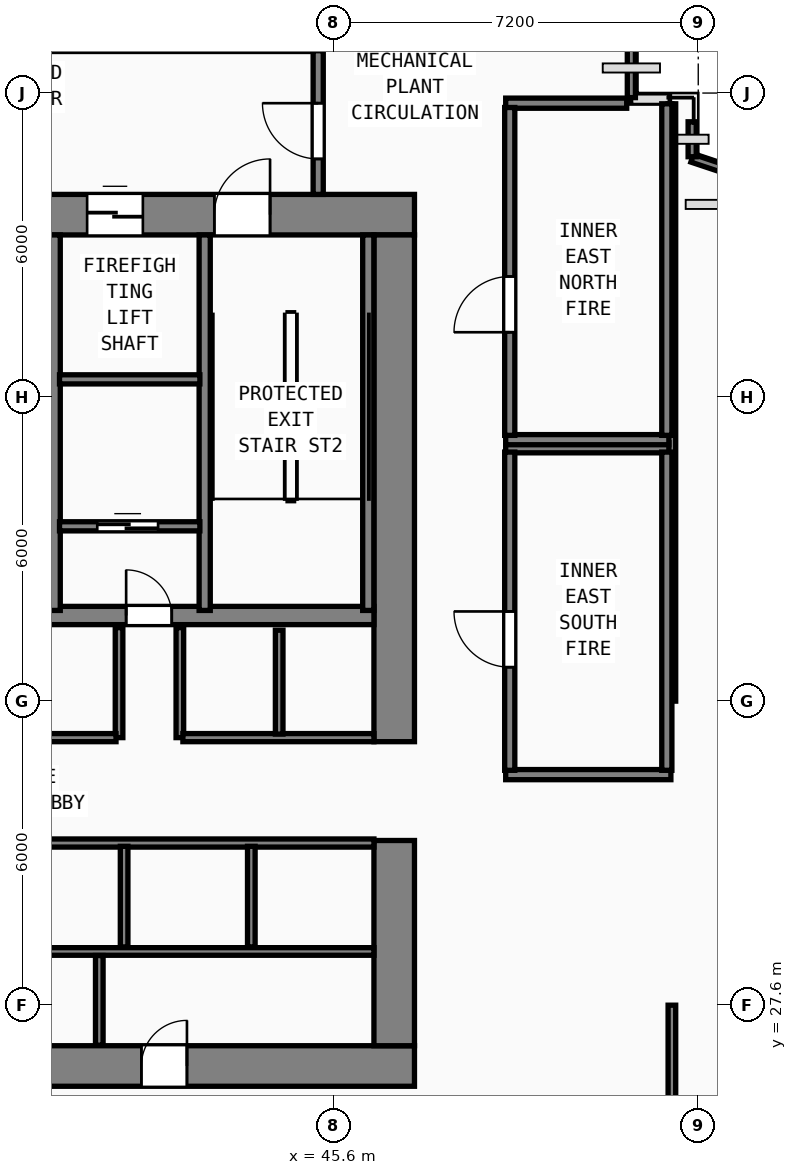
"""IFC4 building model, lengths in metres.
Left out: names, types, materials, properties, quantities, classifications, styles, units other than length and angle.
Written with IfcOpenShell. Run it as: python <this file> out.ifc"""

import sys

from ifc_helpers import new_model, si_unit, direction, frame, frame_2d, origin, origin_2d, place, context, subcontext, project, spatial, rectangle, hollow_rectangle, extrude, element, fill, save


model = new_model("IFC4")
c1 = context("Model", 3, precision=1e-05, world=origin(), true_north=direction((0.0, 1.0)))
c2 = subcontext(c1, "Body", "Model", "MODEL_VIEW")
j1 = project(units=[si_unit("LENGTHUNIT", "METRE"), si_unit("PLANEANGLEUNIT", "RADIAN")], contexts=[c1])
p1 = place(None, origin())
s1 = spatial("IfcSite", under=j1, at=p1, CompositionType="ELEMENT")
p2 = place(p1, origin())
s2 = spatial("IfcBuilding", under=s1, at=p2, CompositionType="ELEMENT")
p3 = place(p2, frame((0.0, 0.0, 89.4)))
s3 = spatial("IfcBuildingStorey", under=s2, at=p3, CompositionType="ELEMENT", Elevation=89.4)
p4 = place(p3, frame((29.6, 26.4, 0.0), z_axis=(0.0, 0.0, 1.0), x_axis=(1.0, 0.0, 0.0)))
e1 = element("IfcWall", 1, at=p4, inside=s3, PredefinedType="SHEAR", context=c2, shape_type="SweptSolid", body=[
    extrude(rectangle(XDim=17.6, YDim=0.8, at=frame_2d((8.8, 0.0))), origin(), (0.0, 0.0, 1.0), 4.35),
])
p5 = place(p4, frame((4.5, 0.0, 0.0), z_axis=(0.0, 0.0, 1.0), x_axis=(-1.0, 0.0, 0.0)))
e2 = element("IfcOpeningElement", 2, at=p5, cuts=e1, PredefinedType="OPENING", context=c2, shape_type="SweptSolid", body=[
    extrude(rectangle(XDim=0.9, YDim=2.1, at=frame_2d((0.45, 1.05))), frame((0.0, 0.41, 0.0), z_axis=(0.0, -1.0, 0.0), x_axis=(1.0, 0.0, 0.0)), (0.0, 0.0, 1.0), 0.82),
])
p6 = place(p4, frame((7.31, 0.0, 0.0), z_axis=(0.0, 0.0, 1.0), x_axis=(-1.0, 0.0, 0.0)))
e3 = element("IfcOpeningElement", 3, at=p6, cuts=e1, PredefinedType="OPENING", context=c2, shape_type="SweptSolid", body=[
    extrude(rectangle(XDim=0.9, YDim=2.1, at=frame_2d((0.45, 1.05))), frame((0.0, 0.41, 0.0), z_axis=(0.0, -1.0, 0.0), x_axis=(1.0, 0.0, 0.0)), (0.0, 0.0, 1.0), 0.82),
])
p7 = place(p4, frame((13.11, 0.0, 0.0), z_axis=(0.0, 0.0, 1.0), x_axis=(-1.0, 0.0, 0.0)))
e4 = element("IfcOpeningElement", 4, at=p7, cuts=e1, PredefinedType="OPENING", context=c2, shape_type="SweptSolid", body=[
    extrude(rectangle(XDim=0.9, YDim=2.1, at=frame_2d((0.45, 1.05))), frame((0.0, 0.41, 0.0), z_axis=(0.0, -1.0, 0.0), x_axis=(1.0, 0.0, 0.0)), (0.0, 0.0, 1.0), 0.82),
])
p8 = place(p3, frame((29.6, 43.2, 0.0), z_axis=(0.0, 0.0, 1.0), x_axis=(1.0, 0.0, 0.0)))
e5 = element("IfcWall", 5, at=p8, inside=s3, PredefinedType="SHEAR", context=c2, shape_type="SweptSolid", body=[
    extrude(rectangle(XDim=17.6, YDim=0.8, at=frame_2d((8.8, 0.0))), origin(), (0.0, 0.0, 1.0), 4.35),
])
p9 = place(p8, frame((2.45, 0.0, 0.0)))
e6 = element("IfcOpeningElement", 6, at=p9, cuts=e5, PredefinedType="OPENING", context=c2, shape_type="SweptSolid", body=[
    extrude(rectangle(XDim=1.1, YDim=2.15, at=frame_2d((0.55, 1.075))), frame((0.0, 0.41, 0.0), z_axis=(0.0, -1.0, 0.0), x_axis=(1.0, 0.0, 0.0)), (0.0, 0.0, 1.0), 0.82),
])
p10 = place(p8, frame((7.56, 0.0, 0.0)))
e7 = element("IfcOpeningElement", 7, at=p10, cuts=e5, PredefinedType="OPENING", context=c2, shape_type="SweptSolid", body=[
    extrude(rectangle(XDim=1.1, YDim=2.15, at=frame_2d((0.55, 1.075))), frame((0.0, 0.41, 0.0), z_axis=(0.0, -1.0, 0.0), x_axis=(1.0, 0.0, 0.0)), (0.0, 0.0, 1.0), 0.82),
])
p11 = place(p8, frame((13.65, 0.0, 0.0)))
e8 = element("IfcOpeningElement", 8, at=p11, cuts=e5, PredefinedType="OPENING", context=c2, shape_type="SweptSolid", body=[
    extrude(rectangle(XDim=1.1, YDim=2.15, at=frame_2d((0.55, 1.075))), frame((0.0, 0.41, 0.0), z_axis=(0.0, -1.0, 0.0), x_axis=(1.0, 0.0, 0.0)), (0.0, 0.0, 1.0), 0.82),
])
p12 = place(p8, frame((4.78, 0.0, 0.0)))
e9 = element("IfcOpeningElement", 9, at=p12, cuts=e5, PredefinedType="OPENING", context=c2, shape_type="SweptSolid", body=[
    extrude(rectangle(XDim=1.1, YDim=2.2, at=frame_2d((0.55, 1.1))), frame((0.0, 0.41, 0.0), z_axis=(0.0, -1.0, 0.0), x_axis=(1.0, 0.0, 0.0)), (0.0, 0.0, 1.0), 0.82),
])
p13 = place(p8, frame((11.14, 0.0, 0.0)))
e10 = element("IfcOpeningElement", 10, at=p13, cuts=e5, PredefinedType="OPENING", context=c2, shape_type="SweptSolid", body=[
    extrude(rectangle(XDim=1.1, YDim=2.2, at=frame_2d((0.55, 1.1))), frame((0.0, 0.41, 0.0), z_axis=(0.0, -1.0, 0.0), x_axis=(1.0, 0.0, 0.0)), (0.0, 0.0, 1.0), 0.82),
])
p14 = place(p3, frame((46.8, 26.8, 0.0), z_axis=(0.0, 0.0, 1.0), x_axis=(0.0, 1.0, 0.0)))
e11 = element("IfcWall", 11, at=p14, inside=s3, PredefinedType="SHEAR", context=c2, shape_type="SweptSolid", body=[
    extrude(rectangle(XDim=4.05, YDim=0.8, at=frame_2d((2.025, 0.0))), origin(), (0.0, 0.0, 1.0), 4.35),
])
p15 = place(p3, frame((46.8, 32.8, 0.0), z_axis=(0.0, 0.0, 1.0), x_axis=(0.0, 1.0, 0.0)))
e12 = element("IfcWall", 12, at=p15, inside=s3, PredefinedType="SHEAR", context=c2, shape_type="SweptSolid", body=[
    extrude(rectangle(XDim=10.0, YDim=0.8, at=frame_2d((5.0, 0.0))), origin(), (0.0, 0.0, 1.0), 4.35),
])
p16 = place(p3, frame((30.4, 35.29, 0.0), z_axis=(0.0, 0.0, 1.0), x_axis=(1.0, 0.0, 0.0)))
e13 = element("IfcWall", 13, at=p16, inside=s3, PredefinedType="SHEAR", context=c2, shape_type="SweptSolid", body=[
    extrude(rectangle(XDim=16.0, YDim=0.36, at=frame_2d((8.0, 0.0))), origin(), (0.0, 0.0, 1.0), 4.35),
])
p17 = place(p16, frame((4.95, 0.0, 0.0), z_axis=(0.0, 0.0, 1.0), x_axis=(-1.0, 0.0, 0.0)))
e14 = element("IfcOpeningElement", 14, at=p17, cuts=e13, PredefinedType="OPENING", context=c2, shape_type="SweptSolid", body=[
    extrude(rectangle(XDim=0.9, YDim=2.1, at=frame_2d((0.45, 1.05))), frame((0.0, 0.19, 0.0), z_axis=(0.0, -1.0, 0.0), x_axis=(1.0, 0.0, 0.0)), (0.0, 0.0, 1.0), 0.38),
])
p18 = place(p16, frame((12.01, 0.0, 0.0), z_axis=(0.0, 0.0, 1.0), x_axis=(-1.0, 0.0, 0.0)))
e15 = element("IfcOpeningElement", 15, at=p18, cuts=e13, PredefinedType="OPENING", context=c2, shape_type="SweptSolid", body=[
    extrude(rectangle(XDim=0.9, YDim=2.1, at=frame_2d((0.45, 1.05))), frame((0.0, 0.19, 0.0), z_axis=(0.0, -1.0, 0.0), x_axis=(1.0, 0.0, 0.0)), (0.0, 0.0, 1.0), 0.38),
])
for number, where, z_axis, x_axis in (
    (16, (40.1, 35.39, 0.0), (0.0, 0.0, 1.0), (0.0, 1.0, 0.0)),
    (17, (43.06, 35.39, 0.0), (0.0, 0.0, 1.0), (0.0, 1.0, 0.0)),
    (18, (46.288, 35.39, 0.0), (0.0, 0.0, 1.0), (0.0, 1.0, 0.0)),
):
    element("IfcWall", number, at=place(p3, frame(where, z_axis=z_axis, x_axis=x_axis)), inside=s3, PredefinedType="SHEAR", context=c2, shape_type="SweptSolid", body=[
        extrude(rectangle(XDim=7.41, YDim=0.22, at=frame_2d((3.705, 0.0))), origin(), (0.0, 0.0, 1.0), 4.35),
    ])
for number, where, z_axis, x_axis in (
    (19, (52.8, 33.6, 0.0), (0.0, 0.0, 1.0), (1.0, 0.0, 0.0)),
    (20, (52.8, 45.6, 0.0), (0.0, 0.0, 1.0), (1.0, 0.0, 0.0)),
):
    element("IfcColumn", number, at=place(p3, frame(where, z_axis=z_axis, x_axis=x_axis)), inside=s3, PredefinedType="COLUMN", context=c2, shape_type="SweptSolid", body=[
        extrude(hollow_rectangle(XDim=1.15, YDim=1.15, WallThickness=0.042, at=origin_2d()), origin(), (0.0, 0.0, 1.0), 4.6),
    ])
for number, where, z_axis, x_axis in (
    (21, (52.8, 27.6, 0.0), (0.0, 0.0, 1.0), (1.0, 0.0, 0.0)),
    (22, (52.8, 39.6, 0.0), (0.0, 0.0, 1.0), (1.0, 0.0, 0.0)),
):
    element("IfcColumn", number, at=place(p3, frame(where, z_axis=z_axis, x_axis=x_axis)), inside=s3, PredefinedType="COLUMN", context=c2, shape_type="SweptSolid", body=[
        extrude(hollow_rectangle(XDim=1.0, YDim=1.0, WallThickness=0.038, at=origin_2d()), origin(), (0.0, 0.0, 1.0), 4.6),
    ])
p19 = place(p3, frame((58.145, 42.492, 0.0), z_axis=(0.0, 0.0, 1.0), x_axis=(-0.948683298051, 0.316227766017, 0.0)))
e23 = element("IfcWall", 23, at=p19, inside=s3, PredefinedType="PARAPET", context=c2, shape_type="SweptSolid", body=[
    extrude(rectangle(XDim=5.76, YDim=0.16, at=frame_2d((2.88, 0.0))), origin(), (0.0, 0.0, 1.0), 1.15),
])
p20 = place(p3, frame((52.68, 44.344, 0.0), z_axis=(0.0, 0.0, 1.0), x_axis=(0.0, 1.0, 0.0)))
e24 = element("IfcWall", 24, at=p20, inside=s3, PredefinedType="PARAPET", context=c2, shape_type="SweptSolid", body=[
    extrude(rectangle(XDim=0.689, YDim=0.16, at=frame_2d((0.345, 0.0))), origin(), (0.0, 0.0, 1.0), 1.15),
])
p21 = place(p3, frame((52.233, 45.48, 0.0), z_axis=(0.0, 0.0, 1.0), x_axis=(-1.0, 0.0, 0.0)))
e25 = element("IfcWall", 25, at=p21, inside=s3, PredefinedType="PARAPET", context=c2, shape_type="SweptSolid", body=[
    extrude(rectangle(XDim=0.753, YDim=0.16, at=frame_2d((0.376, 0.0))), origin(), (0.0, 0.0, 1.0), 1.15),
])
p22 = place(p3, frame((51.48, 45.51, 0.0), z_axis=(0.0, 0.0, 1.0), x_axis=(0.0, 1.0, 0.0)))
e26 = element("IfcWall", 26, at=p22, inside=s3, PredefinedType="PARAPET", context=c2, shape_type="SweptSolid", body=[
    extrude(rectangle(XDim=1.17, YDim=0.16, at=frame_2d((0.585, 0.0))), origin(), (0.0, 0.0, 1.0), 1.15),
])
p23 = place(p3, frame((45.3, 43.6, 0.0), z_axis=(0.0, 0.0, 1.0), x_axis=(0.0, 1.0, 0.0)))
e27 = element("IfcWall", 27, at=p23, inside=s3, PredefinedType="SOLIDWALL", context=c2, shape_type="SweptSolid", body=[
    extrude(rectangle(XDim=2.835, YDim=0.2, at=frame_2d((1.417, 0.0))), origin(), (0.0, 0.0, 1.0), 4.35),
])
p24 = place(p23, frame((0.7, 0.0, 0.0)))
e28 = element("IfcOpeningElement", 28, at=p24, cuts=e27, PredefinedType="OPENING", context=c2, shape_type="SweptSolid", body=[
    extrude(rectangle(XDim=1.1, YDim=2.15, at=frame_2d((0.55, 1.075))), frame((0.0, 0.11, 0.0), z_axis=(0.0, -1.0, 0.0), x_axis=(1.0, 0.0, 0.0)), (0.0, 0.0, 1.0), 0.22),
])
p25 = place(p3, frame((40.195, 39.95, 0.0), z_axis=(0.0, 0.0, 1.0), x_axis=(1.0, 0.0, 0.0)))
e29 = element("IfcWall", 29, at=p25, inside=s3, PredefinedType="SOLIDWALL", context=c2, shape_type="SweptSolid", body=[
    extrude(rectangle(XDim=2.77, YDim=0.18, at=frame_2d((1.385, 0.0))), origin(), (0.0, 0.0, 1.0), 4.35),
])
p26 = place(p3, frame((40.195, 37.05, 0.0), z_axis=(0.0, 0.0, 1.0), x_axis=(1.0, 0.0, 0.0)))
e30 = element("IfcWall", 30, at=p26, inside=s3, PredefinedType="SOLIDWALL", context=c2, shape_type="SweptSolid", body=[
    extrude(rectangle(XDim=2.77, YDim=0.18, at=frame_2d((1.385, 0.0))), origin(), (0.0, 0.0, 1.0), 4.35),
])
p27 = place(p26, frame((1.945, 0.0, 0.0), z_axis=(0.0, 0.0, 1.0), x_axis=(-1.0, 0.0, 0.0)))
e31 = element("IfcOpeningElement", 31, at=p27, cuts=e30, PredefinedType="OPENING", context=c2, shape_type="SweptSolid", body=[
    extrude(rectangle(XDim=1.2, YDim=2.2, at=frame_2d((0.6, 1.1))), frame((0.0, 0.1, 0.0), z_axis=(0.0, -1.0, 0.0), x_axis=(1.0, 0.0, 0.0)), (0.0, 0.0, 1.0), 0.2),
])
for number, where, z_axis, x_axis in (
    (32, (41.37, 32.88, 0.0), (0.0, 0.0, 1.0), (0.0, 1.0, 0.0)),
    (33, (42.57, 32.88, 0.0), (0.0, 0.0, 1.0), (0.0, 1.0, 0.0)),
):
    element("IfcWall", number, at=place(p3, frame(where, z_axis=z_axis, x_axis=x_axis)), inside=s3, PredefinedType="SOLIDWALL", context=c2, shape_type="SweptSolid", body=[
        extrude(rectangle(XDim=2.17, YDim=0.15, at=frame_2d((1.085, 0.0))), origin(), (0.0, 0.0, 1.0), 4.35),
    ])
p28 = place(p3, frame((35.57, 32.88, 0.0), z_axis=(0.0, 0.0, 1.0), x_axis=(1.0, 0.0, 0.0)))
e34 = element("IfcWall", 34, at=p28, inside=s3, PredefinedType="SOLIDWALL", context=c2, shape_type="SweptSolid", body=[
    extrude(rectangle(XDim=5.74, YDim=0.16, at=frame_2d((2.87, 0.0))), origin(), (0.0, 0.0, 1.0), 4.35),
])
p29 = place(p28, frame((1.47, 0.0, 0.0), z_axis=(0.0, 0.0, 1.0), x_axis=(-1.0, 0.0, 0.0)))
e35 = element("IfcOpeningElement", 35, at=p29, cuts=e34, PredefinedType="OPENING", context=c2, shape_type="SweptSolid", body=[
    extrude(rectangle(XDim=1.1, YDim=2.2, at=frame_2d((0.55, 1.1))), frame((0.0, 0.09, 0.0), z_axis=(0.0, -1.0, 0.0), x_axis=(1.0, 0.0, 0.0)), (0.0, 0.0, 1.0), 0.18),
])
p30 = place(p28, frame((3.46, 0.0, 0.0), z_axis=(0.0, 0.0, 1.0), x_axis=(-1.0, 0.0, 0.0)))
e36 = element("IfcOpeningElement", 36, at=p30, cuts=e34, PredefinedType="OPENING", context=c2, shape_type="SweptSolid", body=[
    extrude(rectangle(XDim=1.1, YDim=2.2, at=frame_2d((0.55, 1.1))), frame((0.0, 0.09, 0.0), z_axis=(0.0, -1.0, 0.0), x_axis=(1.0, 0.0, 0.0)), (0.0, 0.0, 1.0), 0.18),
])
p31 = place(p3, frame((42.63, 32.88, 0.0), z_axis=(0.0, 0.0, 1.0), x_axis=(1.0, 0.0, 0.0)))
e37 = element("IfcWall", 37, at=p31, inside=s3, PredefinedType="SOLIDWALL", context=c2, shape_type="SweptSolid", body=[
    extrude(rectangle(XDim=3.77, YDim=0.16, at=frame_2d((1.885, 0.0))), origin(), (0.0, 0.0, 1.0), 4.35),
])
p32 = place(p3, frame((44.53, 32.95, 0.0), z_axis=(0.0, 0.0, 1.0), x_axis=(0.0, 1.0, 0.0)))
e38 = element("IfcWall", 38, at=p32, inside=s3, PredefinedType="SOLIDWALL", context=c2, shape_type="SweptSolid", body=[
    extrude(rectangle(XDim=2.05, YDim=0.15, at=frame_2d((1.025, 0.0))), origin(), (0.0, 0.0, 1.0), 4.35),
])
p33 = place(p3, frame((30.4, 30.8, 0.0), z_axis=(0.0, 0.0, 1.0), x_axis=(1.0, 0.0, 0.0)))
e39 = element("IfcWall", 39, at=p33, inside=s3, PredefinedType="SOLIDWALL", context=c2, shape_type="SweptSolid", body=[
    extrude(rectangle(XDim=16.0, YDim=0.16, at=frame_2d((8.0, 0.0))), origin(), (0.0, 0.0, 1.0), 4.35),
])
p34 = place(p3, frame((30.4, 28.66, 0.0), z_axis=(0.0, 0.0, 1.0), x_axis=(1.0, 0.0, 0.0)))
e40 = element("IfcWall", 40, at=p34, inside=s3, PredefinedType="PARTITIONING", context=c2, shape_type="SweptSolid", body=[
    extrude(rectangle(XDim=16.0, YDim=0.15, at=frame_2d((8.0, 0.0))), origin(), (0.0, 0.0, 1.0), 4.35),
])
p35 = place(p3, frame((40.98, 26.81, 0.0), z_axis=(0.0, 0.0, 1.0), x_axis=(0.0, 1.0, 0.0)))
e41 = element("IfcWall", 41, at=p35, inside=s3, PredefinedType="PARTITIONING", context=c2, shape_type="SweptSolid", body=[
    extrude(rectangle(XDim=1.77, YDim=0.15, at=frame_2d((0.885, 0.0))), origin(), (0.0, 0.0, 1.0), 4.35),
])
for number, where, z_axis, x_axis in (
    (42, (41.47, 28.75, 0.0), (0.0, 0.0, 1.0), (0.0, 1.0, 0.0)),
    (43, (43.98, 28.75, 0.0), (0.0, 0.0, 1.0), (0.0, 1.0, 0.0)),
):
    element("IfcWall", number, at=place(p3, frame(where, z_axis=z_axis, x_axis=x_axis)), inside=s3, PredefinedType="SOLIDWALL", context=c2, shape_type="SweptSolid", body=[
        extrude(rectangle(XDim=1.985, YDim=0.15, at=frame_2d((0.993, 0.0))), origin(), (0.0, 0.0, 1.0), 4.35),
    ])
p36 = place(p3, frame((52.28, 21.688, 0.0), z_axis=(0.0, 0.0, 1.0), x_axis=(0.0, 1.0, 0.0)))
e44 = element("IfcWall", 44, at=p36, inside=s3, PredefinedType="PARTITIONING", context=c2, shape_type="SweptSolid", body=[
    extrude(rectangle(XDim=5.912, YDim=0.15, at=frame_2d((2.956, 0.0))), origin(), (0.0, 0.0, 1.0), 4.35),
])
p37 = place(p3, frame((52.28, 33.6, 0.0), z_axis=(0.0, 0.0, 1.0), x_axis=(0.0, 1.0, 0.0)))
e45 = element("IfcWall", 45, at=p37, inside=s3, PredefinedType="PARTITIONING", context=c2, shape_type="SweptSolid", body=[
    extrude(rectangle(XDim=11.788, YDim=0.15, at=frame_2d((5.894, 0.0))), origin(), (0.0, 0.0, 1.0), 4.35),
])
p38 = place(p3, frame((49.0, 38.6, 0.0), z_axis=(0.0, 0.0, 1.0), x_axis=(1.0, 0.0, 0.0)))
e46 = element("IfcWall", 46, at=p38, inside=s3, PredefinedType="SOLIDWALL", context=c2, shape_type="SweptSolid", body=[
    extrude(rectangle(XDim=3.22, YDim=0.2, at=frame_2d((1.61, 0.0))), origin(), (0.0, 0.0, 1.0), 4.35),
])
p39 = place(p3, frame((49.0, 32.15, 0.0), z_axis=(0.0, 0.0, 1.0), x_axis=(1.0, 0.0, 0.0)))
e47 = element("IfcWall", 47, at=p39, inside=s3, PredefinedType="SOLIDWALL", context=c2, shape_type="SweptSolid", body=[
    extrude(rectangle(XDim=3.26, YDim=0.2, at=frame_2d((1.63, 0.0))), origin(), (0.0, 0.0, 1.0), 4.35),
])
p40 = place(p3, frame((49.08, 32.235, 0.0), z_axis=(0.0, 0.0, 1.0), x_axis=(0.0, 1.0, 0.0)))
e48 = element("IfcWall", 48, at=p40, inside=s3, PredefinedType="SOLIDWALL", context=c2, shape_type="SweptSolid", body=[
    extrude(rectangle(XDim=6.28, YDim=0.2, at=frame_2d((3.14, 0.0))), origin(), (0.0, 0.0, 1.0), 4.35),
])
p41 = place(p40, frame((2.035, 0.0, 0.0)))
e49 = element("IfcOpeningElement", 49, at=p41, cuts=e48, PredefinedType="OPENING", context=c2, shape_type="SweptSolid", body=[
    extrude(rectangle(XDim=1.1, YDim=2.15, at=frame_2d((0.55, 1.075))), frame((0.0, 0.11, 0.0), z_axis=(0.0, -1.0, 0.0), x_axis=(1.0, 0.0, 0.0)), (0.0, 0.0, 1.0), 0.22),
])
p42 = place(p3, frame((52.18, 32.235, 0.0), z_axis=(0.0, 0.0, 1.0), x_axis=(0.0, 1.0, 0.0)))
e50 = element("IfcWall", 50, at=p42, inside=s3, PredefinedType="SOLIDWALL", context=c2, shape_type="SweptSolid", body=[
    extrude(rectangle(XDim=6.28, YDim=0.2, at=frame_2d((3.14, 0.0))), origin(), (0.0, 0.0, 1.0), 4.35),
])
p43 = place(p3, frame((49.0, 45.4, 0.0), z_axis=(0.0, 0.0, 1.0), x_axis=(1.0, 0.0, 0.0)))
e51 = element("IfcWall", 51, at=p43, inside=s3, PredefinedType="SOLIDWALL", context=c2, shape_type="SweptSolid", body=[
    extrude(rectangle(XDim=2.388, YDim=0.2, at=frame_2d((1.194, 0.0))), origin(), (0.0, 0.0, 1.0), 4.35),
])
p44 = place(p3, frame((49.0, 38.76, 0.0), z_axis=(0.0, 0.0, 1.0), x_axis=(1.0, 0.0, 0.0)))
e52 = element("IfcWall", 52, at=p44, inside=s3, PredefinedType="SOLIDWALL", context=c2, shape_type="SweptSolid", body=[
    extrude(rectangle(XDim=3.22, YDim=0.2, at=frame_2d((1.61, 0.0))), origin(), (0.0, 0.0, 1.0), 4.35),
])
p45 = place(p3, frame((49.08, 38.845, 0.0), z_axis=(0.0, 0.0, 1.0), x_axis=(0.0, 1.0, 0.0)))
e53 = element("IfcWall", 53, at=p45, inside=s3, PredefinedType="SOLIDWALL", context=c2, shape_type="SweptSolid", body=[
    extrude(rectangle(XDim=6.47, YDim=0.2, at=frame_2d((3.235, 0.0))), origin(), (0.0, 0.0, 1.0), 4.35),
])
p46 = place(p45, frame((2.035, 0.0, 0.0)))
e54 = element("IfcOpeningElement", 54, at=p46, cuts=e53, PredefinedType="OPENING", context=c2, shape_type="SweptSolid", body=[
    extrude(rectangle(XDim=1.1, YDim=2.15, at=frame_2d((0.55, 1.075))), frame((0.0, 0.11, 0.0), z_axis=(0.0, -1.0, 0.0), x_axis=(1.0, 0.0, 0.0)), (0.0, 0.0, 1.0), 0.22),
])
p47 = place(p3, frame((52.18, 38.845, 0.0), z_axis=(0.0, 0.0, 1.0), x_axis=(0.0, 1.0, 0.0)))
e55 = element("IfcWall", 55, at=p47, inside=s3, PredefinedType="SOLIDWALL", context=c2, shape_type="SweptSolid", body=[
    extrude(rectangle(XDim=6.543, YDim=0.2, at=frame_2d((3.271, 0.0))), origin(), (0.0, 0.0, 1.0), 4.35),
])
p48 = place(p11, origin())
e56 = element("IfcDoor", 56, at=p48, inside=s3, OperationType="SINGLE_SWING_RIGHT", PredefinedType="DOOR", context=c2, shape_type="SweptSolid", body=[
    extrude(rectangle(XDim=1.1, YDim=2.15, at=frame_2d((0.55, 1.075))), frame((0.0, 0.185, 0.0), z_axis=(0.0, -1.0, 0.0), x_axis=(1.0, 0.0, 0.0)), (0.0, 0.0, 1.0), 0.05),
])
fill(e8, e56)
p49 = place(p24, origin())
e57 = element("IfcDoor", 57, at=p49, inside=s3, OperationType="SINGLE_SWING_RIGHT", PredefinedType="DOOR", context=c2, shape_type="SweptSolid", body=[
    extrude(rectangle(XDim=1.1, YDim=2.15, at=frame_2d((0.55, 1.075))), frame((0.0, 0.025, 0.0), z_axis=(0.0, -1.0, 0.0), x_axis=(1.0, 0.0, 0.0)), (0.0, 0.0, 1.0), 0.05),
])
fill(e28, e57)
p50 = place(p13, origin())
e58 = element("IfcDoor", 58, at=p50, inside=s3, OperationType="SLIDING_TO_LEFT", PredefinedType="DOOR", context=c2, shape_type="SweptSolid", body=[
    extrude(rectangle(XDim=1.1, YDim=2.2, at=frame_2d((0.55, 1.1))), frame((0.0, 0.185, 0.0), z_axis=(0.0, -1.0, 0.0), x_axis=(1.0, 0.0, 0.0)), (0.0, 0.0, 1.0), 0.05),
])
fill(e10, e58)
p51 = place(p27, origin())
e59 = element("IfcDoor", 59, at=p51, inside=s3, OperationType="SLIDING_TO_RIGHT", PredefinedType="DOOR", context=c2, shape_type="SweptSolid", body=[
    extrude(rectangle(XDim=1.2, YDim=2.2, at=frame_2d((0.6, 1.1))), frame((0.0, 0.025, 0.0), z_axis=(0.0, -1.0, 0.0), x_axis=(1.0, 0.0, 0.0)), (0.0, 0.0, 1.0), 0.05),
])
fill(e31, e59)
p52 = place(p18, origin())
e60 = element("IfcDoor", 60, at=p52, inside=s3, OperationType="SINGLE_SWING_RIGHT", PredefinedType="DOOR", context=c2, shape_type="SweptSolid", body=[
    extrude(rectangle(XDim=0.9, YDim=2.1, at=frame_2d((0.45, 1.05))), frame((0.0, 0.025, 0.0), z_axis=(0.0, -1.0, 0.0), x_axis=(1.0, 0.0, 0.0)), (0.0, 0.0, 1.0), 0.05),
])
fill(e15, e60)
p53 = place(p7, origin())
e61 = element("IfcDoor", 61, at=p53, inside=s3, OperationType="SINGLE_SWING_LEFT", PredefinedType="DOOR", context=c2, shape_type="SweptSolid", body=[
    extrude(rectangle(XDim=0.9, YDim=2.1, at=frame_2d((0.45, 1.05))), frame((0.0, -0.195, 0.0), z_axis=(0.0, -1.0, 0.0), x_axis=(1.0, 0.0, 0.0)), (0.0, 0.0, 1.0), 0.05),
])
fill(e4, e61)
p54 = place(p41, origin())
e62 = element("IfcDoor", 62, at=p54, inside=s3, OperationType="SINGLE_SWING_RIGHT", PredefinedType="DOOR", context=c2, shape_type="SweptSolid", body=[
    extrude(rectangle(XDim=1.1, YDim=2.15, at=frame_2d((0.55, 1.075))), frame((0.0, 0.025, 0.0), z_axis=(0.0, -1.0, 0.0), x_axis=(1.0, 0.0, 0.0)), (0.0, 0.0, 1.0), 0.05),
])
fill(e49, e62)
p55 = place(p46, origin())
e63 = element("IfcDoor", 63, at=p55, inside=s3, OperationType="SINGLE_SWING_LEFT", PredefinedType="DOOR", context=c2, shape_type="SweptSolid", body=[
    extrude(rectangle(XDim=1.1, YDim=2.15, at=frame_2d((0.55, 1.075))), frame((0.0, 0.025, 0.0), z_axis=(0.0, -1.0, 0.0), x_axis=(1.0, 0.0, 0.0)), (0.0, 0.0, 1.0), 0.05),
])
fill(e54, e63)
save(model, sys.argv[1])
